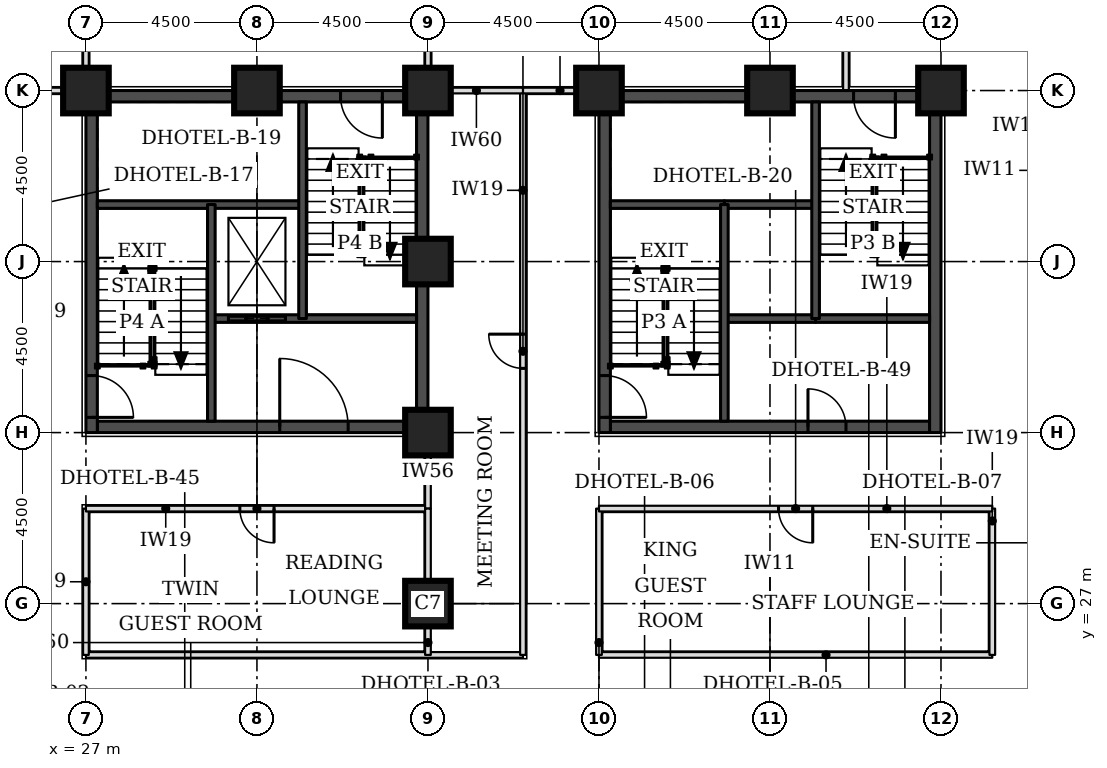
"""IFC4 building model, lengths in metres.
Left out: names, types, materials, properties, quantities, classifications, styles, units other than length and angle.
Written with IfcOpenShell. Run it as: python <this file> out.ifc"""

import sys

from ifc_helpers import new_model, si_unit, direction, frame, frame_2d, origin, origin_2d, place, context, subcontext, project, spatial, rectangle, extrude, element, fill, save


model = new_model("IFC4")
c1 = context("Model", 3, precision=1e-05, world=origin(), true_north=direction((0.0, 1.0)))
c2 = subcontext(c1, "Body", "Model", "MODEL_VIEW")
j1 = project(units=[si_unit("LENGTHUNIT", "METRE"), si_unit("PLANEANGLEUNIT", "RADIAN")], contexts=[c1])
p1 = place(None, origin())
s1 = spatial("IfcSite", under=j1, at=p1, CompositionType="ELEMENT")
p2 = place(p1, origin())
s2 = spatial("IfcBuilding", under=s1, at=p2, CompositionType="ELEMENT")
p3 = place(p2, frame((0.0, 0.0, 52.8)))
s3 = spatial("IfcBuildingStorey", under=s2, at=p3, CompositionType="ELEMENT", Elevation=52.8)
for number, where, z_axis, x_axis in (
    (1, (36.0, 27.0, 0.0), (0.0, 0.0, 1.0), (1.0, 0.0, 0.0)),
    (2, (36.0, 31.5, 0.0), (0.0, 0.0, 1.0), (1.0, 0.0, 0.0)),
    (3, (36.0, 36.0, 0.0), (0.0, 0.0, 1.0), (1.0, 0.0, 0.0)),
    (4, (27.0, 40.5, 0.0), (0.0, 0.0, 1.0), (1.0, 0.0, 0.0)),
    (5, (31.5, 40.5, 0.0), (0.0, 0.0, 1.0), (1.0, 0.0, 0.0)),
    (6, (36.0, 40.5, 0.0), (0.0, 0.0, 1.0), (1.0, 0.0, 0.0)),
    (7, (40.5, 40.5, 0.0), (0.0, 0.0, 1.0), (1.0, 0.0, 0.0)),
    (8, (45.0, 40.5, 0.0), (0.0, 0.0, 1.0), (1.0, 0.0, 0.0)),
    (9, (49.5, 40.5, 0.0), (0.0, 0.0, 1.0), (1.0, 0.0, 0.0)),
):
    element("IfcColumn", number, at=place(p3, frame(where, z_axis=z_axis, x_axis=x_axis)), inside=s3, PredefinedType="COLUMN", context=c2, shape_type="SweptSolid", body=[
        extrude(rectangle(XDim=1.2, YDim=1.2, at=origin_2d()), origin(), (0.0, 0.0, 1.0), 3.3),
    ])
p4 = place(p3, frame((40.8, 31.65, 0.0), z_axis=(0.0, 0.0, 1.0), x_axis=(1.0, 0.0, 0.0)))
e10 = element("IfcWall", 10, at=p4, inside=s3, PredefinedType="SHEAR", context=c2, shape_type="SweptSolid", body=[
    extrude(rectangle(XDim=8.4, YDim=0.3, at=frame_2d((4.2, 0.0))), origin(), (0.0, 0.0, 1.0), 3.3),
])
p5 = place(p4, frame((5.2, 0.0, 0.0)))
e11 = element("IfcOpeningElement", 11, at=p5, cuts=e10, PredefinedType="OPENING", context=c2, shape_type="SweptSolid", body=[
    extrude(rectangle(XDim=1.0, YDim=2.1, at=frame_2d((0.5, 1.05))), frame((0.0, 0.16, 0.0), z_axis=(0.0, -1.0, 0.0), x_axis=(1.0, 0.0, 0.0)), (0.0, 0.0, 1.0), 0.32),
])
p6 = place(p3, frame((40.8, 40.35, 0.0), z_axis=(0.0, 0.0, 1.0), x_axis=(1.0, 0.0, 0.0)))
e12 = element("IfcWall", 12, at=p6, inside=s3, PredefinedType="SHEAR", context=c2, shape_type="SweptSolid", body=[
    extrude(rectangle(XDim=8.4, YDim=0.3, at=frame_2d((4.2, 0.0))), origin(), (0.0, 0.0, 1.0), 3.3),
])
p7 = place(p6, frame((6.4, 0.0, 0.0)))
e13 = element("IfcOpeningElement", 13, at=p7, cuts=e12, PredefinedType="OPENING", context=c2, shape_type="SweptSolid", body=[
    extrude(rectangle(XDim=1.1, YDim=2.1, at=frame_2d((0.55, 1.05))), frame((0.0, 0.16, 0.0), z_axis=(0.0, -1.0, 0.0), x_axis=(1.0, 0.0, 0.0)), (0.0, 0.0, 1.0), 0.32),
])
p8 = place(p3, frame((40.65, 31.5, 0.0), z_axis=(0.0, 0.0, 1.0), x_axis=(0.0, 1.0, 0.0)))
e14 = element("IfcWall", 14, at=p8, inside=s3, PredefinedType="SHEAR", context=c2, shape_type="SweptSolid", body=[
    extrude(rectangle(XDim=9.0, YDim=0.3, at=frame_2d((4.5, 0.0))), origin(), (0.0, 0.0, 1.0), 3.3),
])
p9 = place(p8, frame((0.4, 0.0, 0.0)))
e15 = element("IfcOpeningElement", 15, at=p9, cuts=e14, PredefinedType="OPENING", context=c2, shape_type="SweptSolid", body=[
    extrude(rectangle(XDim=1.1, YDim=2.1, at=frame_2d((0.55, 1.05))), frame((0.0, 0.16, 0.0), z_axis=(0.0, -1.0, 0.0), x_axis=(1.0, 0.0, 0.0)), (0.0, 0.0, 1.0), 0.32),
])
p10 = place(p3, frame((49.35, 31.5, 0.0), z_axis=(0.0, 0.0, 1.0), x_axis=(0.0, 1.0, 0.0)))
e16 = element("IfcWall", 16, at=p10, inside=s3, PredefinedType="SHEAR", context=c2, shape_type="SweptSolid", body=[
    extrude(rectangle(XDim=9.0, YDim=0.3, at=frame_2d((4.5, 0.0))), origin(), (0.0, 0.0, 1.0), 3.3),
])
p11 = place(p3, frame((27.3, 31.65, 0.0), z_axis=(0.0, 0.0, 1.0), x_axis=(1.0, 0.0, 0.0)))
e17 = element("IfcWall", 17, at=p11, inside=s3, PredefinedType="SHEAR", context=c2, shape_type="SweptSolid", body=[
    extrude(rectangle(XDim=8.4, YDim=0.3, at=frame_2d((4.2, 0.0))), origin(), (0.0, 0.0, 1.0), 3.3),
])
p12 = place(p11, frame((4.8, 0.0, 0.0)))
e18 = element("IfcOpeningElement", 18, at=p12, cuts=e17, PredefinedType="OPENING", context=c2, shape_type="SweptSolid", body=[
    extrude(rectangle(XDim=1.8, YDim=2.1, at=frame_2d((0.9, 1.05))), frame((0.0, 0.16, 0.0), z_axis=(0.0, -1.0, 0.0), x_axis=(1.0, 0.0, 0.0)), (0.0, 0.0, 1.0), 0.32),
])
p13 = place(p3, frame((27.3, 40.35, 0.0), z_axis=(0.0, 0.0, 1.0), x_axis=(1.0, 0.0, 0.0)))
e19 = element("IfcWall", 19, at=p13, inside=s3, PredefinedType="SHEAR", context=c2, shape_type="SweptSolid", body=[
    extrude(rectangle(XDim=8.4, YDim=0.3, at=frame_2d((4.2, 0.0))), origin(), (0.0, 0.0, 1.0), 3.3),
])
p14 = place(p13, frame((6.4, 0.0, 0.0)))
e20 = element("IfcOpeningElement", 20, at=p14, cuts=e19, PredefinedType="OPENING", context=c2, shape_type="SweptSolid", body=[
    extrude(rectangle(XDim=1.1, YDim=2.1, at=frame_2d((0.55, 1.05))), frame((0.0, 0.16, 0.0), z_axis=(0.0, -1.0, 0.0), x_axis=(1.0, 0.0, 0.0)), (0.0, 0.0, 1.0), 0.32),
])
p15 = place(p3, frame((27.15, 31.5, 0.0), z_axis=(0.0, 0.0, 1.0), x_axis=(0.0, 1.0, 0.0)))
e21 = element("IfcWall", 21, at=p15, inside=s3, PredefinedType="SHEAR", context=c2, shape_type="SweptSolid", body=[
    extrude(rectangle(XDim=9.0, YDim=0.3, at=frame_2d((4.5, 0.0))), origin(), (0.0, 0.0, 1.0), 3.3),
])
p16 = place(p15, frame((0.4, 0.0, 0.0)))
e22 = element("IfcOpeningElement", 22, at=p16, cuts=e21, PredefinedType="OPENING", context=c2, shape_type="SweptSolid", body=[
    extrude(rectangle(XDim=1.1, YDim=2.1, at=frame_2d((0.55, 1.05))), frame((0.0, 0.16, 0.0), z_axis=(0.0, -1.0, 0.0), x_axis=(1.0, 0.0, 0.0)), (0.0, 0.0, 1.0), 0.32),
])
p17 = place(p3, frame((35.85, 31.5, 0.0), z_axis=(0.0, 0.0, 1.0), x_axis=(0.0, 1.0, 0.0)))
e23 = element("IfcWall", 23, at=p17, inside=s3, PredefinedType="SHEAR", context=c2, shape_type="SweptSolid", body=[
    extrude(rectangle(XDim=9.0, YDim=0.3, at=frame_2d((4.5, 0.0))), origin(), (0.0, 0.0, 1.0), 3.3),
])
p18 = place(p3, frame((27.0, 25.65, 0.0), z_axis=(0.0, 0.0, 1.0), x_axis=(1.0, 0.0, 0.0)))
e24 = element("IfcWall", 24, at=p18, inside=s3, PredefinedType="PARTITIONING", context=c2, shape_type="SweptSolid", body=[
    extrude(rectangle(XDim=11.5, YDim=0.15, at=frame_2d((5.75, 0.0))), origin(), (0.0, 0.0, 1.0), 3.08),
])
p19 = place(p3, frame((27.0, 25.65, 0.0), z_axis=(0.0, 0.0, 1.0), x_axis=(0.0, 1.0, 0.0)))
e25 = element("IfcWall", 25, at=p19, inside=s3, PredefinedType="PARTITIONING", context=c2, shape_type="SweptSolid", body=[
    extrude(rectangle(XDim=3.85, YDim=0.15, at=frame_2d((1.925, 0.0))), origin(), (0.0, 0.0, 1.0), 3.08),
])
p20 = place(p3, frame((38.5, 25.65, 0.0), z_axis=(0.0, 0.0, 1.0), x_axis=(0.0, 1.0, 0.0)))
e26 = element("IfcWall", 26, at=p20, inside=s3, PredefinedType="PARTITIONING", context=c2, shape_type="SweptSolid", body=[
    extrude(rectangle(XDim=14.85, YDim=0.15, at=frame_2d((7.425, 0.0))), origin(), (0.0, 0.0, 1.0), 3.08),
])
p21 = place(p20, frame((7.54, 0.0, 0.0)))
e27 = element("IfcOpeningElement", 27, at=p21, cuts=e26, PredefinedType="OPENING", context=c2, shape_type="SweptSolid", body=[
    extrude(rectangle(XDim=0.9, YDim=2.1, at=frame_2d((0.45, 1.05))), frame((0.0, 0.085, 0.0), z_axis=(0.0, -1.0, 0.0), x_axis=(1.0, 0.0, 0.0)), (0.0, 0.0, 1.0), 0.17),
])
p22 = place(p3, frame((40.5, 25.65, 0.0), z_axis=(0.0, 0.0, 1.0), x_axis=(1.0, 0.0, 0.0)))
e28 = element("IfcWall", 28, at=p22, inside=s3, PredefinedType="PARTITIONING", context=c2, shape_type="SweptSolid", body=[
    extrude(rectangle(XDim=10.35, YDim=0.15, at=frame_2d((5.175, 0.0))), origin(), (0.0, 0.0, 1.0), 3.08),
])
for number, where, z_axis, x_axis in (
    (29, (40.5, 25.65, 0.0), (0.0, 0.0, 1.0), (0.0, 1.0, 0.0)),
    (30, (50.85, 25.65, 0.0), (0.0, 0.0, 1.0), (0.0, 1.0, 0.0)),
):
    element("IfcWall", number, at=place(p3, frame(where, z_axis=z_axis, x_axis=x_axis)), inside=s3, PredefinedType="PARTITIONING", context=c2, shape_type="SweptSolid", body=[
        extrude(rectangle(XDim=3.85, YDim=0.15, at=frame_2d((1.925, 0.0))), origin(), (0.0, 0.0, 1.0), 3.08),
    ])
p23 = place(p3, frame((27.0, 29.5, 0.0), z_axis=(0.0, 0.0, 1.0), x_axis=(1.0, 0.0, 0.0)))
e31 = element("IfcWall", 31, at=p23, inside=s3, PredefinedType="PARTITIONING", context=c2, shape_type="SweptSolid", body=[
    extrude(rectangle(XDim=9.0, YDim=0.15, at=frame_2d((4.5, 0.0))), origin(), (0.0, 0.0, 1.0), 3.08),
])
p24 = place(p23, frame((4.05, 0.0, 0.0)))
e32 = element("IfcOpeningElement", 32, at=p24, cuts=e31, PredefinedType="OPENING", context=c2, shape_type="SweptSolid", body=[
    extrude(rectangle(XDim=0.9, YDim=2.1, at=frame_2d((0.45, 1.05))), frame((0.0, 0.085, 0.0), z_axis=(0.0, -1.0, 0.0), x_axis=(1.0, 0.0, 0.0)), (0.0, 0.0, 1.0), 0.17),
])
p25 = place(p3, frame((36.0, 29.5, 0.0), z_axis=(0.0, 0.0, 1.0), x_axis=(0.0, 1.0, 0.0)))
e33 = element("IfcWall", 33, at=p25, inside=s3, PredefinedType="PARTITIONING", context=c2, shape_type="SweptSolid", body=[
    extrude(rectangle(XDim=1.95, YDim=0.15, at=frame_2d((0.975, 0.0))), origin(), (0.0, 0.0, 1.0), 2.33),
])
p26 = place(p3, frame((40.5, 29.5, 0.0), z_axis=(0.0, 0.0, 1.0), x_axis=(1.0, 0.0, 0.0)))
e34 = element("IfcWall", 34, at=p26, inside=s3, PredefinedType="PARTITIONING", context=c2, shape_type="SweptSolid", body=[
    extrude(rectangle(XDim=10.35, YDim=0.15, at=frame_2d((5.175, 0.0))), origin(), (0.0, 0.0, 1.0), 3.08),
])
p27 = place(p26, frame((4.725, 0.0, 0.0)))
e35 = element("IfcOpeningElement", 35, at=p27, cuts=e34, PredefinedType="OPENING", context=c2, shape_type="SweptSolid", body=[
    extrude(rectangle(XDim=0.9, YDim=2.1, at=frame_2d((0.45, 1.05))), frame((0.0, 0.085, 0.0), z_axis=(0.0, -1.0, 0.0), x_axis=(1.0, 0.0, 0.0)), (0.0, 0.0, 1.0), 0.17),
])
p28 = place(p3, frame((24.6, 40.5, 0.0), z_axis=(0.0, 0.0, 1.0), x_axis=(1.0, 0.0, 0.0)))
e36 = element("IfcWall", 36, at=p28, inside=s3, PredefinedType="PARTITIONING", context=c2, shape_type="SweptSolid", body=[
    extrude(rectangle(XDim=2.35, YDim=0.15, at=frame_2d((1.175, 0.0))), origin(), (0.0, 0.0, 1.0), 2.33),
])
p29 = place(p3, frame((38.5, 40.5, 0.0), z_axis=(0.0, 0.0, 1.0), x_axis=(1.0, 0.0, 0.0)))
e37 = element("IfcWall", 37, at=p29, inside=s3, PredefinedType="PARTITIONING", context=c2, shape_type="SweptSolid", body=[
    extrude(rectangle(XDim=1.95, YDim=0.15, at=frame_2d((0.975, 0.0))), origin(), (0.0, 0.0, 1.0), 2.33),
])
p30 = place(p3, frame((27.0, 40.55, 0.0), z_axis=(0.0, 0.0, 1.0), x_axis=(0.0, 1.0, 0.0)))
e38 = element("IfcWall", 38, at=p30, inside=s3, PredefinedType="PARTITIONING", context=c2, shape_type="SweptSolid", body=[
    extrude(rectangle(XDim=2.45, YDim=0.15, at=frame_2d((1.225, 0.0))), origin(), (0.0, 0.0, 1.0), 3.08),
])
p31 = place(p3, frame((36.0, 40.55, 0.0), z_axis=(0.0, 0.0, 1.0), x_axis=(0.0, 1.0, 0.0)))
e39 = element("IfcWall", 39, at=p31, inside=s3, PredefinedType="PARTITIONING", context=c2, shape_type="SweptSolid", body=[
    extrude(rectangle(XDim=4.4, YDim=0.15, at=frame_2d((2.2, 0.0))), origin(), (0.0, 0.0, 1.0), 2.33),
])
p32 = place(p3, frame((47.0, 40.5, 0.0), z_axis=(0.0, 0.0, 1.0), x_axis=(0.0, 1.0, 0.0)))
e40 = element("IfcWall", 40, at=p32, inside=s3, PredefinedType="PARTITIONING", context=c2, shape_type="SweptSolid", body=[
    extrude(rectangle(XDim=7.0, YDim=0.15, at=frame_2d((3.5, 0.0))), origin(), (0.0, 0.0, 1.0), 3.08),
])
p33 = place(p32, frame((3.05, 0.0, 0.0)))
e41 = element("IfcOpeningElement", 41, at=p33, cuts=e40, PredefinedType="OPENING", context=c2, shape_type="SweptSolid", body=[
    extrude(rectangle(XDim=0.9, YDim=2.1, at=frame_2d((0.45, 1.05))), frame((0.0, 0.085, 0.0), z_axis=(0.0, -1.0, 0.0), x_axis=(1.0, 0.0, 0.0)), (0.0, 0.0, 1.0), 0.17),
])
p34 = place(p3, frame((36.0, 25.65, 0.0), z_axis=(0.0, 0.0, 1.0), x_axis=(0.0, 1.0, 0.0)))
e42 = element("IfcWall", 42, at=p34, inside=s3, PredefinedType="PARTITIONING", context=c2, shape_type="SweptSolid", body=[
    extrude(rectangle(XDim=3.85, YDim=0.15, at=frame_2d((1.925, 0.0))), origin(), (0.0, 0.0, 1.0), 2.33),
])
p35 = place(p3, frame((36.05, 40.5, 0.0), z_axis=(0.0, 0.0, 1.0), x_axis=(1.0, 0.0, 0.0)))
e43 = element("IfcWall", 43, at=p35, inside=s3, PredefinedType="PARTITIONING", context=c2, shape_type="SweptSolid", body=[
    extrude(rectangle(XDim=2.45, YDim=0.15, at=frame_2d((1.225, 0.0))), origin(), (0.0, 0.0, 1.0), 2.33),
])
p36 = place(p3, frame((43.8, 34.5, 0.0), z_axis=(0.0, 0.0, 1.0), x_axis=(1.0, 0.0, 0.0)))
e44 = element("IfcWall", 44, at=p36, inside=s3, PredefinedType="SOLIDWALL", context=c2, shape_type="SweptSolid", body=[
    extrude(rectangle(XDim=2.4, YDim=0.2, at=frame_2d((1.2, 0.0))), origin(), (0.0, 0.0, 1.0), 3.08),
])
p37 = place(p3, frame((46.2, 34.5, 0.0), z_axis=(0.0, 0.0, 1.0), x_axis=(1.0, 0.0, 0.0)))
e45 = element("IfcWall", 45, at=p37, inside=s3, PredefinedType="SOLIDWALL", context=c2, shape_type="SweptSolid", body=[
    extrude(rectangle(XDim=3.0, YDim=0.2, at=frame_2d((1.5, 0.0))), origin(), (0.0, 0.0, 1.0), 3.08),
])
p38 = place(p3, frame((43.8, 37.5, 0.0), z_axis=(0.0, 0.0, 1.0), x_axis=(1.0, 0.0, 0.0)))
e46 = element("IfcWall", 46, at=p38, inside=s3, PredefinedType="SOLIDWALL", context=c2, shape_type="SweptSolid", body=[
    extrude(rectangle(XDim=2.4, YDim=0.2, at=frame_2d((1.2, 0.0))), origin(), (0.0, 0.0, 1.0), 3.3),
])
p39 = place(p3, frame((40.8, 37.5, 0.0), z_axis=(0.0, 0.0, 1.0), x_axis=(1.0, 0.0, 0.0)))
e47 = element("IfcWall", 47, at=p39, inside=s3, PredefinedType="SOLIDWALL", context=c2, shape_type="SweptSolid", body=[
    extrude(rectangle(XDim=3.0, YDim=0.2, at=frame_2d((1.5, 0.0))), origin(), (0.0, 0.0, 1.0), 3.08),
])
for number, where, z_axis, x_axis in (
    (48, (43.8, 31.8, 0.0), (0.0, 0.0, 1.0), (0.0, 1.0, 0.0)),
    (49, (46.2, 34.5, 0.0), (0.0, 0.0, 1.0), (0.0, 1.0, 0.0)),
):
    element("IfcWall", number, at=place(p3, frame(where, z_axis=z_axis, x_axis=x_axis)), inside=s3, PredefinedType="SOLIDWALL", context=c2, shape_type="SweptSolid", body=[
        extrude(rectangle(XDim=5.7, YDim=0.2, at=frame_2d((2.85, 0.0))), origin(), (0.0, 0.0, 1.0), 3.08),
    ])
p40 = place(p3, frame((30.3, 34.5, 0.0), z_axis=(0.0, 0.0, 1.0), x_axis=(1.0, 0.0, 0.0)))
e50 = element("IfcWall", 50, at=p40, inside=s3, PredefinedType="SOLIDWALL", context=c2, shape_type="SweptSolid", body=[
    extrude(rectangle(XDim=5.4, YDim=0.2, at=frame_2d((2.7, 0.0))), origin(), (0.0, 0.0, 1.0), 3.08),
])
p41 = place(p40, frame((0.45, 0.0, 0.0)))
e51 = element("IfcOpeningElement", 51, at=p41, cuts=e50, PredefinedType="OPENING", context=c2, shape_type="SweptSolid", body=[
    extrude(rectangle(XDim=1.5, YDim=2.1, at=frame_2d((0.75, 1.05))), frame((0.0, 0.11, 0.0), z_axis=(0.0, -1.0, 0.0), x_axis=(1.0, 0.0, 0.0)), (0.0, 0.0, 1.0), 0.22),
])
p42 = place(p3, frame((27.3, 37.5, 0.0), z_axis=(0.0, 0.0, 1.0), x_axis=(1.0, 0.0, 0.0)))
e52 = element("IfcWall", 52, at=p42, inside=s3, PredefinedType="SOLIDWALL", context=c2, shape_type="SweptSolid", body=[
    extrude(rectangle(XDim=5.4, YDim=0.2, at=frame_2d((2.7, 0.0))), origin(), (0.0, 0.0, 1.0), 3.08),
])
for number, where, z_axis, x_axis in (
    (53, (30.3, 31.8, 0.0), (0.0, 0.0, 1.0), (0.0, 1.0, 0.0)),
    (54, (32.7, 34.5, 0.0), (0.0, 0.0, 1.0), (0.0, 1.0, 0.0)),
):
    element("IfcWall", number, at=place(p3, frame(where, z_axis=z_axis, x_axis=x_axis)), inside=s3, PredefinedType="SOLIDWALL", context=c2, shape_type="SweptSolid", body=[
        extrude(rectangle(XDim=5.7, YDim=0.2, at=frame_2d((2.85, 0.0))), origin(), (0.0, 0.0, 1.0), 3.08),
    ])
p43 = place(p24, frame((0.9, 0.0, 0.0), z_axis=(0.0, 0.0, 1.0), x_axis=(-1.0, 0.0, 0.0)))
e55 = element("IfcDoor", 55, at=p43, inside=s3, OperationType="SINGLE_SWING_LEFT", PredefinedType="DOOR", context=c2, shape_type="SweptSolid", body=[
    extrude(rectangle(XDim=0.9, YDim=2.1, at=frame_2d((0.45, 1.05))), frame((0.0, 0.025, 0.0), z_axis=(0.0, -1.0, 0.0), x_axis=(1.0, 0.0, 0.0)), (0.0, 0.0, 1.0), 0.05),
])
fill(e32, e55)
p44 = place(p27, frame((0.9, 0.0, 0.0), z_axis=(0.0, 0.0, 1.0), x_axis=(-1.0, 0.0, 0.0)))
e56 = element("IfcDoor", 56, at=p44, inside=s3, OperationType="SINGLE_SWING_LEFT", PredefinedType="DOOR", context=c2, shape_type="SweptSolid", body=[
    extrude(rectangle(XDim=0.9, YDim=2.1, at=frame_2d((0.45, 1.05))), frame((0.0, 0.025, 0.0), z_axis=(0.0, -1.0, 0.0), x_axis=(1.0, 0.0, 0.0)), (0.0, 0.0, 1.0), 0.05),
])
fill(e35, e56)
p45 = place(p21, origin())
e57 = element("IfcDoor", 57, at=p45, inside=s3, OperationType="SINGLE_SWING_RIGHT", PredefinedType="DOOR", context=c2, shape_type="SweptSolid", body=[
    extrude(rectangle(XDim=0.9, YDim=2.1, at=frame_2d((0.45, 1.05))), frame((0.0, 0.025, 0.0), z_axis=(0.0, -1.0, 0.0), x_axis=(1.0, 0.0, 0.0)), (0.0, 0.0, 1.0), 0.05),
])
fill(e27, e57)
p46 = place(p9, frame((1.1, 0.0, 0.0), z_axis=(0.0, 0.0, 1.0), x_axis=(-1.0, 0.0, 0.0)))
e58 = element("IfcDoor", 58, at=p46, inside=s3, OperationType="SINGLE_SWING_RIGHT", PredefinedType="DOOR", context=c2, shape_type="SweptSolid", body=[
    extrude(rectangle(XDim=1.1, YDim=2.1, at=frame_2d((0.55, 1.05))), frame((0.0, 0.025, 0.0), z_axis=(0.0, -1.0, 0.0), x_axis=(1.0, 0.0, 0.0)), (0.0, 0.0, 1.0), 0.05),
])
fill(e15, e58)
p47 = place(p7, frame((1.1, 0.0, 0.0), z_axis=(0.0, 0.0, 1.0), x_axis=(-1.0, 0.0, 0.0)))
e59 = element("IfcDoor", 59, at=p47, inside=s3, OperationType="SINGLE_SWING_LEFT", PredefinedType="DOOR", context=c2, shape_type="SweptSolid", body=[
    extrude(rectangle(XDim=1.1, YDim=2.1, at=frame_2d((0.55, 1.05))), frame((0.0, 0.025, 0.0), z_axis=(0.0, -1.0, 0.0), x_axis=(1.0, 0.0, 0.0)), (0.0, 0.0, 1.0), 0.05),
])
fill(e13, e59)
p48 = place(p5, origin())
e60 = element("IfcDoor", 60, at=p48, inside=s3, OperationType="SINGLE_SWING_LEFT", PredefinedType="DOOR", context=c2, shape_type="SweptSolid", body=[
    extrude(rectangle(XDim=1.0, YDim=2.1, at=frame_2d((0.5, 1.05))), frame((0.0, 0.025, 0.0), z_axis=(0.0, -1.0, 0.0), x_axis=(1.0, 0.0, 0.0)), (0.0, 0.0, 1.0), 0.05),
])
fill(e11, e60)
p49 = place(p16, frame((1.1, 0.0, 0.0), z_axis=(0.0, 0.0, 1.0), x_axis=(-1.0, 0.0, 0.0)))
e61 = element("IfcDoor", 61, at=p49, inside=s3, OperationType="SINGLE_SWING_RIGHT", PredefinedType="DOOR", context=c2, shape_type="SweptSolid", body=[
    extrude(rectangle(XDim=1.1, YDim=2.1, at=frame_2d((0.55, 1.05))), frame((0.0, 0.025, 0.0), z_axis=(0.0, -1.0, 0.0), x_axis=(1.0, 0.0, 0.0)), (0.0, 0.0, 1.0), 0.05),
])
fill(e22, e61)
p50 = place(p14, frame((1.1, 0.0, 0.0), z_axis=(0.0, 0.0, 1.0), x_axis=(-1.0, 0.0, 0.0)))
e62 = element("IfcDoor", 62, at=p50, inside=s3, OperationType="SINGLE_SWING_LEFT", PredefinedType="DOOR", context=c2, shape_type="SweptSolid", body=[
    extrude(rectangle(XDim=1.1, YDim=2.1, at=frame_2d((0.55, 1.05))), frame((0.0, 0.025, 0.0), z_axis=(0.0, -1.0, 0.0), x_axis=(1.0, 0.0, 0.0)), (0.0, 0.0, 1.0), 0.05),
])
fill(e20, e62)
p51 = place(p41, origin())
e63 = element("IfcDoor", 63, at=p51, inside=s3, OperationType="DOUBLE_DOOR_SLIDING", PredefinedType="DOOR", context=c2, shape_type="SweptSolid", body=[
    extrude(rectangle(XDim=1.5, YDim=2.1, at=frame_2d((0.75, 1.05))), frame((0.0, 0.025, 0.0), z_axis=(0.0, -1.0, 0.0), x_axis=(1.0, 0.0, 0.0)), (0.0, 0.0, 1.0), 0.05),
])
fill(e51, e63)
p52 = place(p12, origin())
e64 = element("IfcDoor", 64, at=p52, inside=s3, OperationType="SINGLE_SWING_LEFT", PredefinedType="DOOR", context=c2, shape_type="SweptSolid", body=[
    extrude(rectangle(XDim=1.8, YDim=2.1, at=frame_2d((0.9, 1.05))), frame((0.0, 0.025, 0.0), z_axis=(0.0, -1.0, 0.0), x_axis=(1.0, 0.0, 0.0)), (0.0, 0.0, 1.0), 0.05),
])
fill(e18, e64)
save(model, sys.argv[1])
